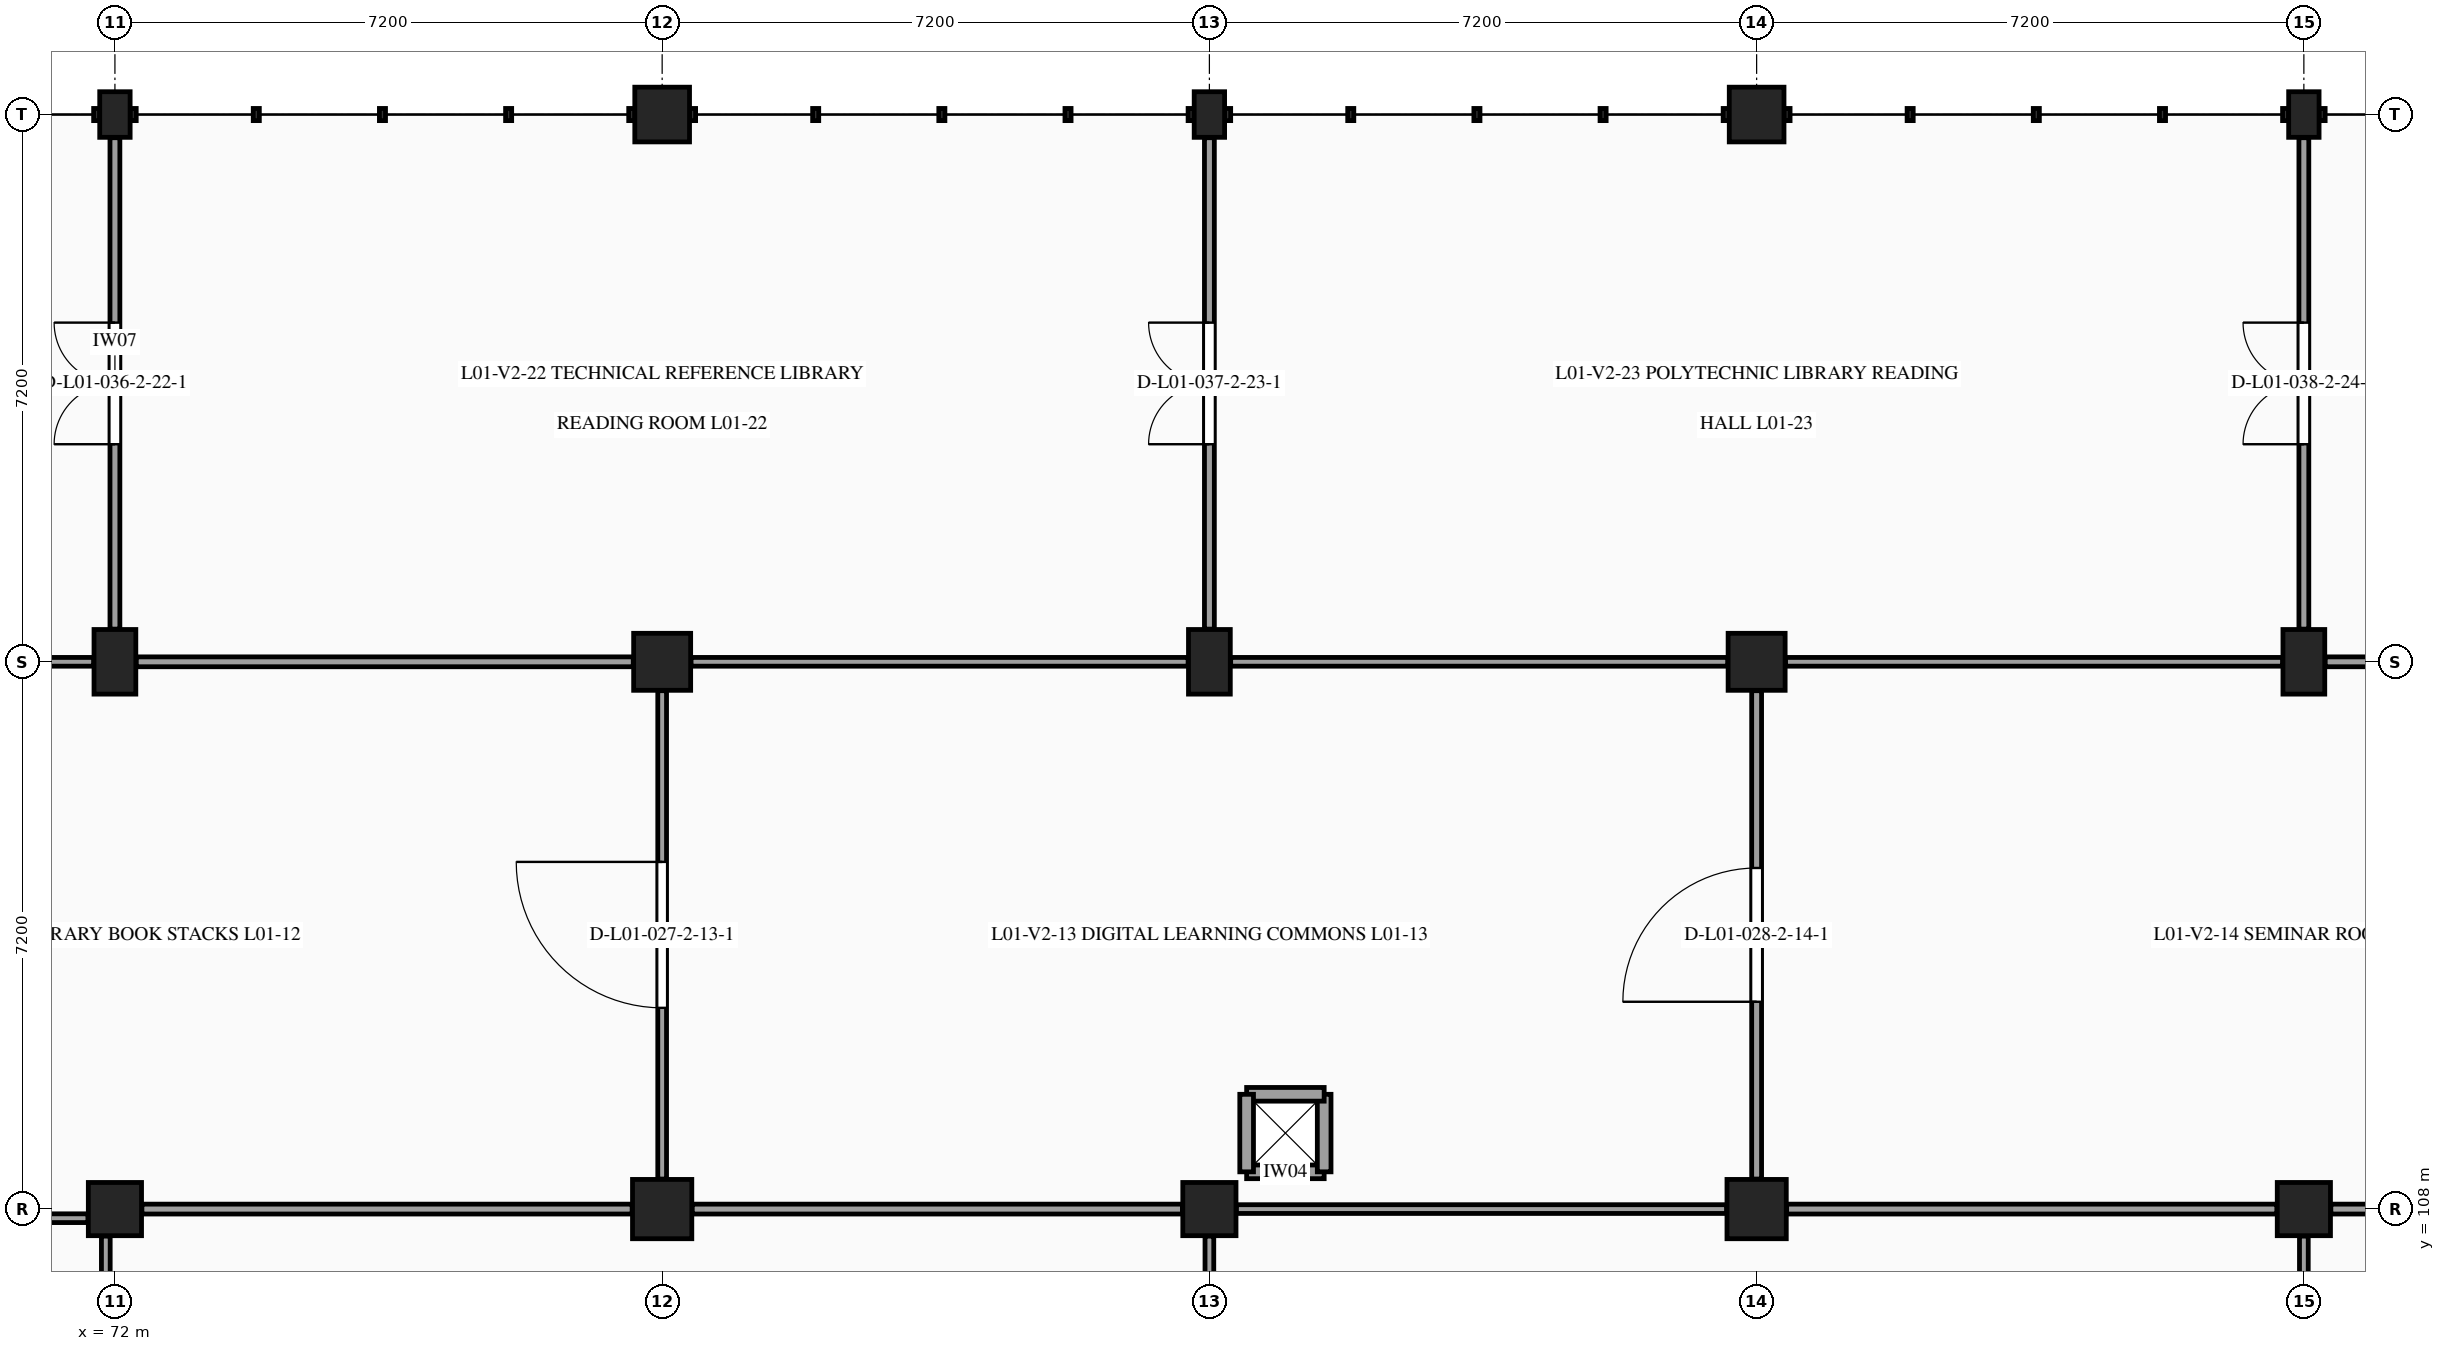
"""IFC4 building model, lengths in metres.
Left out: names, types, materials, properties, quantities, classifications, styles, units other than length and angle.
Written with IfcOpenShell. Run it as: python <this file> out.ifc"""

import sys

from ifc_helpers import new_model, si_unit, direction, frame, frame_2d, origin, origin_2d, place, context, subcontext, project, spatial, rectangle, extrude, element, fill, save


model = new_model("IFC4")
c1 = context("Model", 3, precision=1e-05, world=origin(), true_north=direction((0.0, 1.0)))
c2 = subcontext(c1, "Body", "Model", "MODEL_VIEW")
j1 = project(units=[si_unit("LENGTHUNIT", "METRE"), si_unit("PLANEANGLEUNIT", "RADIAN")], contexts=[c1])
p1 = place(None, origin())
s1 = spatial("IfcSite", under=j1, at=p1, CompositionType="ELEMENT")
p2 = place(p1, origin())
s2 = spatial("IfcBuilding", under=s1, at=p2, CompositionType="ELEMENT")
p3 = place(p2, frame((0.0, 0.0, 5.4)))
s3 = spatial("IfcBuildingStorey", under=s2, at=p3, CompositionType="ELEMENT", Elevation=5.4)
p4 = place(p3, frame((72.0, 108.0, 0.0), z_axis=(0.0, 0.0, 1.0), x_axis=(1.0, 0.0, 0.0)))
e1 = element("IfcColumn", 1, at=p4, inside=s3, PredefinedType="COLUMN", context=c2, shape_type="SweptSolid", body=[
    extrude(rectangle(XDim=0.7, YDim=0.7, at=origin_2d()), origin(), (0.0, 0.0, 1.0), 4.5),
])
p5 = place(p3, frame((72.0, 115.2, 0.0), z_axis=(0.0, 0.0, 1.0), x_axis=(1.0, 0.0, 0.0)))
e2 = element("IfcColumn", 2, at=p5, inside=s3, PredefinedType="COLUMN", context=c2, shape_type="SweptSolid", body=[
    extrude(rectangle(XDim=0.55, YDim=0.85, at=origin_2d()), origin(), (0.0, 0.0, 1.0), 4.5),
])
p6 = place(p3, frame((72.0, 122.4, 0.0), z_axis=(0.0, 0.0, 1.0), x_axis=(1.0, 0.0, 0.0)))
e3 = element("IfcColumn", 3, at=p6, inside=s3, PredefinedType="PILASTER", context=c2, shape_type="SweptSolid", body=[
    extrude(rectangle(XDim=0.4, YDim=0.6, at=origin_2d()), origin(), (0.0, 0.0, 1.0), 4.5),
])
p7 = place(p3, frame((79.2, 108.0, 0.0), z_axis=(0.0, 0.0, 1.0), x_axis=(1.0, 0.0, 0.0)))
e4 = element("IfcColumn", 4, at=p7, inside=s3, PredefinedType="COLUMN", context=c2, shape_type="SweptSolid", body=[
    extrude(rectangle(XDim=0.78, YDim=0.78, at=origin_2d()), origin(), (0.0, 0.0, 1.0), 4.5),
])
p8 = place(p3, frame((79.2, 115.2, 0.0), z_axis=(0.0, 0.0, 1.0), x_axis=(1.0, 0.0, 0.0)))
e5 = element("IfcColumn", 5, at=p8, inside=s3, PredefinedType="COLUMN", context=c2, shape_type="SweptSolid", body=[
    extrude(rectangle(XDim=0.75, YDim=0.75, at=origin_2d()), origin(), (0.0, 0.0, 1.0), 4.5),
])
p9 = place(p3, frame((79.2, 122.4, 0.0), z_axis=(0.0, 0.0, 1.0), x_axis=(1.0, 0.0, 0.0)))
e6 = element("IfcColumn", 6, at=p9, inside=s3, PredefinedType="COLUMN", context=c2, shape_type="SweptSolid", body=[
    extrude(rectangle(XDim=0.72, YDim=0.72, at=origin_2d()), origin(), (0.0, 0.0, 1.0), 4.5),
])
p10 = place(p3, frame((86.4, 108.0, 0.0), z_axis=(0.0, 0.0, 1.0), x_axis=(1.0, 0.0, 0.0)))
e7 = element("IfcColumn", 7, at=p10, inside=s3, PredefinedType="COLUMN", context=c2, shape_type="SweptSolid", body=[
    extrude(rectangle(XDim=0.7, YDim=0.7, at=origin_2d()), origin(), (0.0, 0.0, 1.0), 4.5),
])
p11 = place(p3, frame((86.4, 115.2, 0.0), z_axis=(0.0, 0.0, 1.0), x_axis=(1.0, 0.0, 0.0)))
e8 = element("IfcColumn", 8, at=p11, inside=s3, PredefinedType="COLUMN", context=c2, shape_type="SweptSolid", body=[
    extrude(rectangle(XDim=0.55, YDim=0.85, at=origin_2d()), origin(), (0.0, 0.0, 1.0), 4.5),
])
p12 = place(p3, frame((86.4, 122.4, 0.0), z_axis=(0.0, 0.0, 1.0), x_axis=(1.0, 0.0, 0.0)))
e9 = element("IfcColumn", 9, at=p12, inside=s3, PredefinedType="PILASTER", context=c2, shape_type="SweptSolid", body=[
    extrude(rectangle(XDim=0.4, YDim=0.6, at=origin_2d()), origin(), (0.0, 0.0, 1.0), 4.5),
])
p13 = place(p3, frame((93.6, 108.0, 0.0), z_axis=(0.0, 0.0, 1.0), x_axis=(1.0, 0.0, 0.0)))
e10 = element("IfcColumn", 10, at=p13, inside=s3, PredefinedType="COLUMN", context=c2, shape_type="SweptSolid", body=[
    extrude(rectangle(XDim=0.78, YDim=0.78, at=origin_2d()), origin(), (0.0, 0.0, 1.0), 4.5),
])
p14 = place(p3, frame((93.6, 115.2, 0.0), z_axis=(0.0, 0.0, 1.0), x_axis=(1.0, 0.0, 0.0)))
e11 = element("IfcColumn", 11, at=p14, inside=s3, PredefinedType="COLUMN", context=c2, shape_type="SweptSolid", body=[
    extrude(rectangle(XDim=0.75, YDim=0.75, at=origin_2d()), origin(), (0.0, 0.0, 1.0), 4.5),
])
p15 = place(p3, frame((93.6, 122.4, 0.0), z_axis=(0.0, 0.0, 1.0), x_axis=(1.0, 0.0, 0.0)))
e12 = element("IfcColumn", 12, at=p15, inside=s3, PredefinedType="COLUMN", context=c2, shape_type="SweptSolid", body=[
    extrude(rectangle(XDim=0.72, YDim=0.72, at=origin_2d()), origin(), (0.0, 0.0, 1.0), 4.5),
])
p16 = place(p3, frame((100.8, 108.0, 0.0), z_axis=(0.0, 0.0, 1.0), x_axis=(1.0, 0.0, 0.0)))
e13 = element("IfcColumn", 13, at=p16, inside=s3, PredefinedType="COLUMN", context=c2, shape_type="SweptSolid", body=[
    extrude(rectangle(XDim=0.7, YDim=0.7, at=origin_2d()), origin(), (0.0, 0.0, 1.0), 4.5),
])
p17 = place(p3, frame((100.8, 115.2, 0.0), z_axis=(0.0, 0.0, 1.0), x_axis=(1.0, 0.0, 0.0)))
e14 = element("IfcColumn", 14, at=p17, inside=s3, PredefinedType="COLUMN", context=c2, shape_type="SweptSolid", body=[
    extrude(rectangle(XDim=0.55, YDim=0.85, at=origin_2d()), origin(), (0.0, 0.0, 1.0), 4.5),
])
p18 = place(p3, frame((100.8, 122.4, 0.0), z_axis=(0.0, 0.0, 1.0), x_axis=(1.0, 0.0, 0.0)))
e15 = element("IfcColumn", 15, at=p18, inside=s3, PredefinedType="PILASTER", context=c2, shape_type="SweptSolid", body=[
    extrude(rectangle(XDim=0.4, YDim=0.6, at=origin_2d()), origin(), (0.0, 0.0, 1.0), 4.5),
])
p19 = place(p3, frame((65.195, 107.88, 0.0), z_axis=(0.0, 0.0, 1.0), x_axis=(1.0, 0.0, 0.0)))
e16 = element("IfcWall", 16, at=p19, inside=s3, PredefinedType="PARTITIONING", context=c2, shape_type="SweptSolid", body=[
    extrude(rectangle(XDim=6.45, YDim=0.115, at=frame_2d((3.225, 0.0))), origin(), (0.0, 0.0, 1.0), 3.43),
])
p20 = place(p3, frame((71.88, 101.165, 0.0), z_axis=(0.0, 0.0, 1.0), x_axis=(0.0, 1.0, 0.0)))
e17 = element("IfcWall", 17, at=p20, inside=s3, PredefinedType="PARTITIONING", context=c2, shape_type="SweptSolid", body=[
    extrude(rectangle(XDim=6.48, YDim=0.115, at=frame_2d((3.24, 0.0))), origin(), (0.0, 0.0, 1.0), 3.525),
])
for number, where, z_axis, x_axis in (
    (18, (86.89, 108.49, 0.0), (0.0, 0.0, 1.0), (1.0, 0.0, 0.0)),
    (19, (87.91, 108.49, 0.0), (0.0, 0.0, 1.0), (0.0, 1.0, 0.0)),
    (20, (87.91, 109.51, 0.0), (0.0, 0.0, 1.0), (-1.0, 0.0, 0.0)),
    (21, (86.89, 109.51, 0.0), (0.0, 0.0, 1.0), (0.0, -1.0, 0.0)),
):
    element("IfcWall", number, at=place(p3, frame(where, z_axis=z_axis, x_axis=x_axis)), inside=s3, PredefinedType="PARTITIONING", context=c2, shape_type="SweptSolid", body=[
        extrude(rectangle(XDim=1.02, YDim=0.18, at=frame_2d((0.51, 0.0))), origin(), (0.0, 0.0, 1.0), 4.21),
    ])
p21 = place(p3, frame((65.18, 115.2, 0.0), z_axis=(0.0, 0.0, 1.0), x_axis=(1.0, 0.0, 0.0)))
e22 = element("IfcWall", 22, at=p21, inside=s3, PredefinedType="PARTITIONING", context=c2, shape_type="SweptSolid", body=[
    extrude(rectangle(XDim=6.54, YDim=0.115, at=frame_2d((3.27, 0.0))), origin(), (0.0, 0.0, 1.0), 3.43),
])
p22 = place(p3, frame((72.0, 115.63, 0.0), z_axis=(0.0, 0.0, 1.0), x_axis=(0.0, 1.0, 0.0)))
e23 = element("IfcWall", 23, at=p22, inside=s3, PredefinedType="PARTITIONING", context=c2, shape_type="SweptSolid", body=[
    extrude(rectangle(XDim=6.465, YDim=0.13, at=frame_2d((3.232, 0.0))), origin(), (0.0, 0.0, 1.0), 3.52),
])
p23 = place(p22, frame((2.433, 0.0, 0.0)))
e24 = element("IfcOpeningElement", 24, at=p23, cuts=e23, PredefinedType="OPENING", context=c2, shape_type="SweptSolid", body=[
    extrude(rectangle(XDim=1.6, YDim=2.2, at=frame_2d((0.8, 1.1))), frame((0.0, 0.075, 0.0), z_axis=(0.0, -1.0, 0.0), x_axis=(1.0, 0.0, 0.0)), (0.0, 0.0, 1.0), 0.15),
])
p24 = place(p3, frame((72.355, 108.0, 0.0), z_axis=(0.0, 0.0, 1.0), x_axis=(1.0, 0.0, 0.0)))
e25 = element("IfcWall", 25, at=p24, inside=s3, PredefinedType="PARTITIONING", context=c2, shape_type="SweptSolid", body=[
    extrude(rectangle(XDim=6.45, YDim=0.13, at=frame_2d((3.225, 0.0))), origin(), (0.0, 0.0, 1.0), 3.46),
])
p25 = place(p3, frame((79.2, 108.395, 0.0), z_axis=(0.0, 0.0, 1.0), x_axis=(0.0, 1.0, 0.0)))
e26 = element("IfcWall", 26, at=p25, inside=s3, PredefinedType="PARTITIONING", context=c2, shape_type="SweptSolid", body=[
    extrude(rectangle(XDim=6.425, YDim=0.115, at=frame_2d((3.212, 0.0))), origin(), (0.0, 0.0, 1.0), 3.525),
])
p26 = place(p25, frame((2.252, 0.0, 0.0)))
e27 = element("IfcOpeningElement", 27, at=p26, cuts=e26, PredefinedType="OPENING", context=c2, shape_type="SweptSolid", body=[
    extrude(rectangle(XDim=1.92, YDim=2.35, at=frame_2d((0.96, 1.175))), frame((0.0, 0.067, 0.0), z_axis=(0.0, -1.0, 0.0), x_axis=(1.0, 0.0, 0.0)), (0.0, 0.0, 1.0), 0.135),
])
p27 = place(p3, frame((72.28, 115.2, 0.0), z_axis=(0.0, 0.0, 1.0), x_axis=(1.0, 0.0, 0.0)))
e28 = element("IfcWall", 28, at=p27, inside=s3, PredefinedType="PARTITIONING", context=c2, shape_type="SweptSolid", body=[
    extrude(rectangle(XDim=6.54, YDim=0.13, at=frame_2d((3.27, 0.0))), origin(), (0.0, 0.0, 1.0), 3.46),
])
p28 = place(p3, frame((86.4, 101.165, 0.0), z_axis=(0.0, 0.0, 1.0), x_axis=(0.0, 1.0, 0.0)))
e29 = element("IfcWall", 29, at=p28, inside=s3, PredefinedType="PARTITIONING", context=c2, shape_type="SweptSolid", body=[
    extrude(rectangle(XDim=6.48, YDim=0.115, at=frame_2d((3.24, 0.0))), origin(), (0.0, 0.0, 1.0), 3.525),
])
p29 = place(p28, frame((2.44, 0.0, 0.0)))
e30 = element("IfcOpeningElement", 30, at=p29, cuts=e29, PredefinedType="OPENING", context=c2, shape_type="SweptSolid", body=[
    extrude(rectangle(XDim=1.6, YDim=2.2, at=frame_2d((0.8, 1.1))), frame((0.0, 0.067, 0.0), z_axis=(0.0, -1.0, 0.0), x_axis=(1.0, 0.0, 0.0)), (0.0, 0.0, 1.0), 0.135),
])
p30 = place(p3, frame((79.595, 108.0, 0.0), z_axis=(0.0, 0.0, 1.0), x_axis=(1.0, 0.0, 0.0)))
e31 = element("IfcWall", 31, at=p30, inside=s3, PredefinedType="PARTITIONING", context=c2, shape_type="SweptSolid", body=[
    extrude(rectangle(XDim=6.45, YDim=0.13, at=frame_2d((3.225, 0.0))), origin(), (0.0, 0.0, 1.0), 3.47),
])
p31 = place(p3, frame((79.58, 115.2, 0.0), z_axis=(0.0, 0.0, 1.0), x_axis=(1.0, 0.0, 0.0)))
e32 = element("IfcWall", 32, at=p31, inside=s3, PredefinedType="PARTITIONING", context=c2, shape_type="SweptSolid", body=[
    extrude(rectangle(XDim=6.54, YDim=0.115, at=frame_2d((3.27, 0.0))), origin(), (0.0, 0.0, 1.0), 3.47),
])
p32 = place(p3, frame((86.4, 115.63, 0.0), z_axis=(0.0, 0.0, 1.0), x_axis=(0.0, 1.0, 0.0)))
e33 = element("IfcWall", 33, at=p32, inside=s3, PredefinedType="PARTITIONING", context=c2, shape_type="SweptSolid", body=[
    extrude(rectangle(XDim=6.465, YDim=0.13, at=frame_2d((3.232, 0.0))), origin(), (0.0, 0.0, 1.0), 3.52),
])
p33 = place(p32, frame((2.433, 0.0, 0.0)))
e34 = element("IfcOpeningElement", 34, at=p33, cuts=e33, PredefinedType="OPENING", context=c2, shape_type="SweptSolid", body=[
    extrude(rectangle(XDim=1.6, YDim=2.2, at=frame_2d((0.8, 1.1))), frame((0.0, 0.075, 0.0), z_axis=(0.0, -1.0, 0.0), x_axis=(1.0, 0.0, 0.0)), (0.0, 0.0, 1.0), 0.15),
])
p34 = place(p3, frame((86.755, 108.0, 0.0), z_axis=(0.0, 0.0, 1.0), x_axis=(1.0, 0.0, 0.0)))
e35 = element("IfcWall", 35, at=p34, inside=s3, PredefinedType="PARTITIONING", context=c2, shape_type="SweptSolid", body=[
    extrude(rectangle(XDim=6.45, YDim=0.115, at=frame_2d((3.225, 0.0))), origin(), (0.0, 0.0, 1.0), 3.485),
])
p35 = place(p3, frame((93.6, 108.395, 0.0), z_axis=(0.0, 0.0, 1.0), x_axis=(0.0, 1.0, 0.0)))
e36 = element("IfcWall", 36, at=p35, inside=s3, PredefinedType="PARTITIONING", context=c2, shape_type="SweptSolid", body=[
    extrude(rectangle(XDim=6.425, YDim=0.13, at=frame_2d((3.212, 0.0))), origin(), (0.0, 0.0, 1.0), 3.525),
])
p36 = place(p35, frame((2.333, 0.0, 0.0)))
e37 = element("IfcOpeningElement", 37, at=p36, cuts=e36, PredefinedType="OPENING", context=c2, shape_type="SweptSolid", body=[
    extrude(rectangle(XDim=1.76, YDim=2.3, at=frame_2d((0.88, 1.15))), frame((0.0, 0.075, 0.0), z_axis=(0.0, -1.0, 0.0), x_axis=(1.0, 0.0, 0.0)), (0.0, 0.0, 1.0), 0.15),
])
p37 = place(p3, frame((86.68, 115.2, 0.0), z_axis=(0.0, 0.0, 1.0), x_axis=(1.0, 0.0, 0.0)))
e38 = element("IfcWall", 38, at=p37, inside=s3, PredefinedType="PARTITIONING", context=c2, shape_type="SweptSolid", body=[
    extrude(rectangle(XDim=6.54, YDim=0.115, at=frame_2d((3.27, 0.0))), origin(), (0.0, 0.0, 1.0), 3.485),
])
p38 = place(p3, frame((100.8, 101.165, 0.0), z_axis=(0.0, 0.0, 1.0), x_axis=(0.0, 1.0, 0.0)))
e39 = element("IfcWall", 39, at=p38, inside=s3, PredefinedType="PARTITIONING", context=c2, shape_type="SweptSolid", body=[
    extrude(rectangle(XDim=6.48, YDim=0.115, at=frame_2d((3.24, 0.0))), origin(), (0.0, 0.0, 1.0), 3.525),
])
p39 = place(p38, frame((2.55, 0.0, 0.0)))
e40 = element("IfcOpeningElement", 40, at=p39, cuts=e39, PredefinedType="OPENING", context=c2, shape_type="SweptSolid", body=[
    extrude(rectangle(XDim=1.38, YDim=2.22, at=frame_2d((0.69, 1.11))), frame((0.0, 0.067, 0.0), z_axis=(0.0, -1.0, 0.0), x_axis=(1.0, 0.0, 0.0)), (0.0, 0.0, 1.0), 0.135),
])
p40 = place(p3, frame((93.995, 108.0, 0.0), z_axis=(0.0, 0.0, 1.0), x_axis=(1.0, 0.0, 0.0)))
e41 = element("IfcWall", 41, at=p40, inside=s3, PredefinedType="PARTITIONING", context=c2, shape_type="SweptSolid", body=[
    extrude(rectangle(XDim=6.45, YDim=0.13, at=frame_2d((3.225, 0.0))), origin(), (0.0, 0.0, 1.0), 3.49),
])
p41 = place(p3, frame((93.98, 115.2, 0.0), z_axis=(0.0, 0.0, 1.0), x_axis=(1.0, 0.0, 0.0)))
e42 = element("IfcWall", 42, at=p41, inside=s3, PredefinedType="PARTITIONING", context=c2, shape_type="SweptSolid", body=[
    extrude(rectangle(XDim=6.54, YDim=0.115, at=frame_2d((3.27, 0.0))), origin(), (0.0, 0.0, 1.0), 3.49),
])
p42 = place(p3, frame((100.8, 115.63, 0.0), z_axis=(0.0, 0.0, 1.0), x_axis=(0.0, 1.0, 0.0)))
e43 = element("IfcWall", 43, at=p42, inside=s3, PredefinedType="PARTITIONING", context=c2, shape_type="SweptSolid", body=[
    extrude(rectangle(XDim=6.465, YDim=0.13, at=frame_2d((3.232, 0.0))), origin(), (0.0, 0.0, 1.0), 3.52),
])
p43 = place(p42, frame((2.433, 0.0, 0.0)))
e44 = element("IfcOpeningElement", 44, at=p43, cuts=e43, PredefinedType="OPENING", context=c2, shape_type="SweptSolid", body=[
    extrude(rectangle(XDim=1.6, YDim=2.2, at=frame_2d((0.8, 1.1))), frame((0.0, 0.075, 0.0), z_axis=(0.0, -1.0, 0.0), x_axis=(1.0, 0.0, 0.0)), (0.0, 0.0, 1.0), 0.15),
])
p44 = place(p3, frame((101.155, 108.0, 0.0), z_axis=(0.0, 0.0, 1.0), x_axis=(1.0, 0.0, 0.0)))
e45 = element("IfcWall", 45, at=p44, inside=s3, PredefinedType="PARTITIONING", context=c2, shape_type="SweptSolid", body=[
    extrude(rectangle(XDim=6.45, YDim=0.13, at=frame_2d((3.225, 0.0))), origin(), (0.0, 0.0, 1.0), 3.51),
])
p45 = place(p3, frame((101.08, 115.2, 0.0), z_axis=(0.0, 0.0, 1.0), x_axis=(1.0, 0.0, 0.0)))
e46 = element("IfcWall", 46, at=p45, inside=s3, PredefinedType="PARTITIONING", context=c2, shape_type="SweptSolid", body=[
    extrude(rectangle(XDim=6.54, YDim=0.13, at=frame_2d((3.27, 0.0))), origin(), (0.0, 0.0, 1.0), 3.51),
])
p46 = place(p26, origin())
e47 = element("IfcDoor", 47, at=p46, inside=s3, OperationType="SINGLE_SWING_RIGHT", PredefinedType="DOOR", context=c2, shape_type="SweptSolid", body=[
    extrude(rectangle(XDim=1.92, YDim=2.35, at=frame_2d((0.96, 1.175))), frame((0.0, 0.025, 0.0), z_axis=(0.0, -1.0, 0.0), x_axis=(1.0, 0.0, 0.0)), (0.0, 0.0, 1.0), 0.05),
])
fill(e27, e47)
p47 = place(p36, origin())
e48 = element("IfcDoor", 48, at=p47, inside=s3, OperationType="SINGLE_SWING_LEFT", PredefinedType="DOOR", context=c2, shape_type="SweptSolid", body=[
    extrude(rectangle(XDim=1.76, YDim=2.3, at=frame_2d((0.88, 1.15))), frame((0.0, 0.025, 0.0), z_axis=(0.0, -1.0, 0.0), x_axis=(1.0, 0.0, 0.0)), (0.0, 0.0, 1.0), 0.05),
])
fill(e37, e48)
p48 = place(p23, origin())
e49 = element("IfcDoor", 49, at=p48, inside=s3, OperationType="DOUBLE_DOOR_SINGLE_SWING", PredefinedType="DOOR", context=c2, shape_type="SweptSolid", body=[
    extrude(rectangle(XDim=1.6, YDim=2.2, at=frame_2d((0.8, 1.1))), frame((0.0, 0.025, 0.0), z_axis=(0.0, -1.0, 0.0), x_axis=(1.0, 0.0, 0.0)), (0.0, 0.0, 1.0), 0.05),
])
fill(e24, e49)
p49 = place(p33, origin())
e50 = element("IfcDoor", 50, at=p49, inside=s3, OperationType="DOUBLE_DOOR_SINGLE_SWING", PredefinedType="DOOR", context=c2, shape_type="SweptSolid", body=[
    extrude(rectangle(XDim=1.6, YDim=2.2, at=frame_2d((0.8, 1.1))), frame((0.0, 0.025, 0.0), z_axis=(0.0, -1.0, 0.0), x_axis=(1.0, 0.0, 0.0)), (0.0, 0.0, 1.0), 0.05),
])
fill(e34, e50)
p50 = place(p43, origin())
e51 = element("IfcDoor", 51, at=p50, inside=s3, OperationType="DOUBLE_DOOR_SINGLE_SWING", PredefinedType="DOOR", context=c2, shape_type="SweptSolid", body=[
    extrude(rectangle(XDim=1.6, YDim=2.2, at=frame_2d((0.8, 1.1))), frame((0.0, 0.025, 0.0), z_axis=(0.0, -1.0, 0.0), x_axis=(1.0, 0.0, 0.0)), (0.0, 0.0, 1.0), 0.05),
])
fill(e44, e51)
save(model, sys.argv[1])
